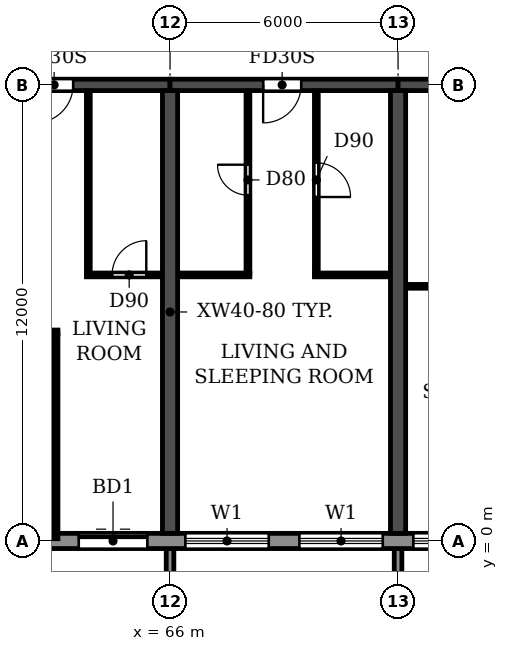
"""IFC4 building model, lengths in metres.
Left out: names, types, materials, properties, quantities, classifications, styles, units other than length and angle.
Written with IfcOpenShell. Run it as: python <this file> out.ifc"""

import sys

from ifc_helpers import new_model, si_unit, direction, frame, frame_2d, origin, place, context, subcontext, project, spatial, polyline, rectangle, outline, extrude, source, transform, mapped, element, fill, save


model = new_model("IFC4")
c1 = context("Model", 3, precision=1e-05, world=origin(), true_north=direction((0.0, 1.0)))
c2 = subcontext(c1, "Body", "Model", "MODEL_VIEW")
j1 = project(units=[si_unit("LENGTHUNIT", "METRE"), si_unit("PLANEANGLEUNIT", "RADIAN")], contexts=[c1])
p1 = place(None, origin())
s1 = spatial("IfcSite", under=j1, at=p1, CompositionType="ELEMENT")
p2 = place(p1, origin())
s2 = spatial("IfcBuilding", under=s1, at=p2, CompositionType="ELEMENT")
p3 = place(p2, frame((0.0, 0.0, 23.4)))
s3 = spatial("IfcBuildingStorey", under=s2, at=p3, CompositionType="ELEMENT", Elevation=23.4)
for number, where, z_axis, x_axis in (
    (1, (66.0, 0.2, 0.0), (0.0, 0.0, 1.0), (0.0, 1.0, 0.0)),
    (2, (72.0, 0.2, 0.0), (0.0, 0.0, 1.0), (0.0, 1.0, 0.0)),
):
    element("IfcWall", number, at=place(p3, frame(where, z_axis=z_axis, x_axis=x_axis)), inside=s3, PredefinedType="SHEAR", context=c2, shape_type="SweptSolid", body=[
        extrude(rectangle(XDim=11.65, YDim=0.4, at=frame_2d((5.825, 0.0))), origin(), (0.0, 0.0, 1.0), 3.05),
    ])
p4 = place(p3, frame((60.0, 12.0, 0.0), z_axis=(0.0, 0.0, 1.0), x_axis=(1.0, 0.0, 0.0)))
e3 = element("IfcWall", 3, at=p4, inside=s3, PredefinedType="SHEAR", context=c2, shape_type="SweptSolid", body=[
    extrude(rectangle(XDim=6.0, YDim=0.3, at=frame_2d((3.0, 0.0))), origin(), (0.0, 0.0, 1.0), 2.45),
])
p5 = place(p4, frame((2.45, 0.0, 0.0)))
e4 = element("IfcOpeningElement", 4, at=p5, cuts=e3, PredefinedType="OPENING", context=c2, shape_type="SweptSolid", body=[
    extrude(rectangle(XDim=1.0, YDim=2.1, at=frame_2d((0.5, 1.05))), frame((0.0, 0.16, 0.0), z_axis=(0.0, -1.0, 0.0), x_axis=(1.0, 0.0, 0.0)), (0.0, 0.0, 1.0), 0.32),
])
p6 = place(p3, frame((66.0, 12.0, 0.0), z_axis=(0.0, 0.0, 1.0), x_axis=(1.0, 0.0, 0.0)))
e5 = element("IfcWall", 5, at=p6, inside=s3, PredefinedType="SHEAR", context=c2, shape_type="SweptSolid", body=[
    extrude(rectangle(XDim=6.0, YDim=0.3, at=frame_2d((3.0, 0.0))), origin(), (0.0, 0.0, 1.0), 2.45),
])
p7 = place(p6, frame((2.45, 0.0, 0.0)))
e6 = element("IfcOpeningElement", 6, at=p7, cuts=e5, PredefinedType="OPENING", context=c2, shape_type="SweptSolid", body=[
    extrude(rectangle(XDim=1.0, YDim=2.1, at=frame_2d((0.5, 1.05))), frame((0.0, 0.16, 0.0), z_axis=(0.0, -1.0, 0.0), x_axis=(1.0, 0.0, 0.0)), (0.0, 0.0, 1.0), 0.32),
])
p8 = place(p3, frame((72.0, 12.0, 0.0), z_axis=(0.0, 0.0, 1.0), x_axis=(1.0, 0.0, 0.0)))
e7 = element("IfcWall", 7, at=p8, inside=s3, PredefinedType="SHEAR", context=c2, shape_type="SweptSolid", body=[
    extrude(rectangle(XDim=6.0, YDim=0.3, at=frame_2d((3.0, 0.0))), origin(), (0.0, 0.0, 1.0), 2.45),
])
p9 = place(p8, frame((2.55, 0.0, 0.0)))
e8 = element("IfcOpeningElement", 8, at=p9, cuts=e7, PredefinedType="OPENING", context=c2, shape_type="SweptSolid", body=[
    extrude(rectangle(XDim=1.0, YDim=2.1, at=frame_2d((0.5, 1.05))), frame((0.0, 0.16, 0.0), z_axis=(0.0, -1.0, 0.0), x_axis=(1.0, 0.0, 0.0)), (0.0, 0.0, 1.0), 0.32),
])
p10 = place(p3, frame((4.683, 0.0, 0.0), z_axis=(0.0, 0.0, 1.0), x_axis=(1.0, 0.0, 0.0)))
e9 = element("IfcWall", 9, at=p10, inside=s3, PredefinedType="STANDARD", context=c2, shape_type="SweptSolid", body=[
    extrude(rectangle(XDim=92.634, YDim=0.4, at=frame_2d((46.317, 0.0))), origin(), (0.0, 0.0, 1.0), 3.05),
])
p11 = place(p10, frame((1.717, 0.0, 0.9)))
e10 = element("IfcOpeningElement", 10, at=p11, cuts=e9, PredefinedType="OPENING", context=c2, shape_type="SweptSolid", body=[
    extrude(rectangle(XDim=2.2, YDim=1.5, at=frame_2d((1.1, 0.75))), frame((0.0, 0.21, 0.0), z_axis=(0.0, -1.0, 0.0), x_axis=(1.0, 0.0, 0.0)), (0.0, 0.0, 1.0), 0.42),
])
p12 = place(p10, frame((4.717, 0.0, 0.9)))
e11 = element("IfcOpeningElement", 11, at=p12, cuts=e9, PredefinedType="OPENING", context=c2, shape_type="SweptSolid", body=[
    extrude(rectangle(XDim=2.2, YDim=1.5, at=frame_2d((1.1, 0.75))), frame((0.0, 0.21, 0.0), z_axis=(0.0, -1.0, 0.0), x_axis=(1.0, 0.0, 0.0)), (0.0, 0.0, 1.0), 0.42),
])
p13 = place(p10, frame((7.717, 0.0, 0.9)))
e12 = element("IfcOpeningElement", 12, at=p13, cuts=e9, PredefinedType="OPENING", context=c2, shape_type="SweptSolid", body=[
    extrude(rectangle(XDim=2.2, YDim=1.5, at=frame_2d((1.1, 0.75))), frame((0.0, 0.21, 0.0), z_axis=(0.0, -1.0, 0.0), x_axis=(1.0, 0.0, 0.0)), (0.0, 0.0, 1.0), 0.42),
])
p14 = place(p10, frame((10.717, 0.0, 0.9)))
e13 = element("IfcOpeningElement", 13, at=p14, cuts=e9, PredefinedType="OPENING", context=c2, shape_type="SweptSolid", body=[
    extrude(rectangle(XDim=2.2, YDim=1.5, at=frame_2d((1.1, 0.75))), frame((0.0, 0.21, 0.0), z_axis=(0.0, -1.0, 0.0), x_axis=(1.0, 0.0, 0.0)), (0.0, 0.0, 1.0), 0.42),
])
p15 = place(p10, frame((13.717, 0.0, 0.9)))
e14 = element("IfcOpeningElement", 14, at=p15, cuts=e9, PredefinedType="OPENING", context=c2, shape_type="SweptSolid", body=[
    extrude(rectangle(XDim=2.2, YDim=1.5, at=frame_2d((1.1, 0.75))), frame((0.0, 0.21, 0.0), z_axis=(0.0, -1.0, 0.0), x_axis=(1.0, 0.0, 0.0)), (0.0, 0.0, 1.0), 0.42),
])
p16 = place(p10, frame((16.717, 0.0, 0.9)))
e15 = element("IfcOpeningElement", 15, at=p16, cuts=e9, PredefinedType="OPENING", context=c2, shape_type="SweptSolid", body=[
    extrude(rectangle(XDim=2.2, YDim=1.5, at=frame_2d((1.1, 0.75))), frame((0.0, 0.21, 0.0), z_axis=(0.0, -1.0, 0.0), x_axis=(1.0, 0.0, 0.0)), (0.0, 0.0, 1.0), 0.42),
])
p17 = place(p10, frame((19.917, 0.0, 0.0)))
e16 = element("IfcOpeningElement", 16, at=p17, cuts=e9, PredefinedType="OPENING", context=c2, shape_type="SweptSolid", body=[
    extrude(rectangle(XDim=1.8, YDim=2.4, at=frame_2d((0.9, 1.2))), frame((0.0, 0.21, 0.0), z_axis=(0.0, -1.0, 0.0), x_axis=(1.0, 0.0, 0.0)), (0.0, 0.0, 1.0), 0.42),
])
p18 = place(p10, frame((22.717, 0.0, 0.9)))
e17 = element("IfcOpeningElement", 17, at=p18, cuts=e9, PredefinedType="OPENING", context=c2, shape_type="SweptSolid", body=[
    extrude(rectangle(XDim=2.2, YDim=1.5, at=frame_2d((1.1, 0.75))), frame((0.0, 0.21, 0.0), z_axis=(0.0, -1.0, 0.0), x_axis=(1.0, 0.0, 0.0)), (0.0, 0.0, 1.0), 0.42),
])
p19 = place(p10, frame((25.717, 0.0, 0.9)))
e18 = element("IfcOpeningElement", 18, at=p19, cuts=e9, PredefinedType="OPENING", context=c2, shape_type="SweptSolid", body=[
    extrude(rectangle(XDim=2.2, YDim=1.5, at=frame_2d((1.1, 0.75))), frame((0.0, 0.21, 0.0), z_axis=(0.0, -1.0, 0.0), x_axis=(1.0, 0.0, 0.0)), (0.0, 0.0, 1.0), 0.42),
])
p20 = place(p10, frame((28.717, 0.0, 0.9)))
e19 = element("IfcOpeningElement", 19, at=p20, cuts=e9, PredefinedType="OPENING", context=c2, shape_type="SweptSolid", body=[
    extrude(rectangle(XDim=2.2, YDim=1.5, at=frame_2d((1.1, 0.75))), frame((0.0, 0.21, 0.0), z_axis=(0.0, -1.0, 0.0), x_axis=(1.0, 0.0, 0.0)), (0.0, 0.0, 1.0), 0.42),
])
p21 = place(p10, frame((31.917, 0.0, 0.0)))
e20 = element("IfcOpeningElement", 20, at=p21, cuts=e9, PredefinedType="OPENING", context=c2, shape_type="SweptSolid", body=[
    extrude(rectangle(XDim=1.8, YDim=2.4, at=frame_2d((0.9, 1.2))), frame((0.0, 0.21, 0.0), z_axis=(0.0, -1.0, 0.0), x_axis=(1.0, 0.0, 0.0)), (0.0, 0.0, 1.0), 0.42),
])
p22 = place(p10, frame((34.717, 0.0, 0.9)))
e21 = element("IfcOpeningElement", 21, at=p22, cuts=e9, PredefinedType="OPENING", context=c2, shape_type="SweptSolid", body=[
    extrude(rectangle(XDim=2.2, YDim=1.5, at=frame_2d((1.1, 0.75))), frame((0.0, 0.21, 0.0), z_axis=(0.0, -1.0, 0.0), x_axis=(1.0, 0.0, 0.0)), (0.0, 0.0, 1.0), 0.42),
])
p23 = place(p10, frame((37.717, 0.0, 0.9)))
e22 = element("IfcOpeningElement", 22, at=p23, cuts=e9, PredefinedType="OPENING", context=c2, shape_type="SweptSolid", body=[
    extrude(rectangle(XDim=2.2, YDim=1.5, at=frame_2d((1.1, 0.75))), frame((0.0, 0.21, 0.0), z_axis=(0.0, -1.0, 0.0), x_axis=(1.0, 0.0, 0.0)), (0.0, 0.0, 1.0), 0.42),
])
p24 = place(p10, frame((40.717, 0.0, 0.9)))
e23 = element("IfcOpeningElement", 23, at=p24, cuts=e9, PredefinedType="OPENING", context=c2, shape_type="SweptSolid", body=[
    extrude(rectangle(XDim=2.2, YDim=1.5, at=frame_2d((1.1, 0.75))), frame((0.0, 0.21, 0.0), z_axis=(0.0, -1.0, 0.0), x_axis=(1.0, 0.0, 0.0)), (0.0, 0.0, 1.0), 0.42),
])
p25 = place(p10, frame((43.917, 0.0, 0.0)))
e24 = element("IfcOpeningElement", 24, at=p25, cuts=e9, PredefinedType="OPENING", context=c2, shape_type="SweptSolid", body=[
    extrude(rectangle(XDim=1.8, YDim=2.4, at=frame_2d((0.9, 1.2))), frame((0.0, 0.21, 0.0), z_axis=(0.0, -1.0, 0.0), x_axis=(1.0, 0.0, 0.0)), (0.0, 0.0, 1.0), 0.42),
])
p26 = place(p10, frame((46.717, 0.0, 0.9)))
e25 = element("IfcOpeningElement", 25, at=p26, cuts=e9, PredefinedType="OPENING", context=c2, shape_type="SweptSolid", body=[
    extrude(rectangle(XDim=2.2, YDim=1.5, at=frame_2d((1.1, 0.75))), frame((0.0, 0.21, 0.0), z_axis=(0.0, -1.0, 0.0), x_axis=(1.0, 0.0, 0.0)), (0.0, 0.0, 1.0), 0.42),
])
p27 = place(p10, frame((49.717, 0.0, 0.9)))
e26 = element("IfcOpeningElement", 26, at=p27, cuts=e9, PredefinedType="OPENING", context=c2, shape_type="SweptSolid", body=[
    extrude(rectangle(XDim=2.2, YDim=1.5, at=frame_2d((1.1, 0.75))), frame((0.0, 0.21, 0.0), z_axis=(0.0, -1.0, 0.0), x_axis=(1.0, 0.0, 0.0)), (0.0, 0.0, 1.0), 0.42),
])
p28 = place(p10, frame((52.717, 0.0, 0.9)))
e27 = element("IfcOpeningElement", 27, at=p28, cuts=e9, PredefinedType="OPENING", context=c2, shape_type="SweptSolid", body=[
    extrude(rectangle(XDim=2.2, YDim=1.5, at=frame_2d((1.1, 0.75))), frame((0.0, 0.21, 0.0), z_axis=(0.0, -1.0, 0.0), x_axis=(1.0, 0.0, 0.0)), (0.0, 0.0, 1.0), 0.42),
])
p29 = place(p10, frame((55.717, 0.0, 0.9)))
e28 = element("IfcOpeningElement", 28, at=p29, cuts=e9, PredefinedType="OPENING", context=c2, shape_type="SweptSolid", body=[
    extrude(rectangle(XDim=2.2, YDim=1.5, at=frame_2d((1.1, 0.75))), frame((0.0, 0.21, 0.0), z_axis=(0.0, -1.0, 0.0), x_axis=(1.0, 0.0, 0.0)), (0.0, 0.0, 1.0), 0.42),
])
p30 = place(p10, frame((58.917, 0.0, 0.0)))
e29 = element("IfcOpeningElement", 29, at=p30, cuts=e9, PredefinedType="OPENING", context=c2, shape_type="SweptSolid", body=[
    extrude(rectangle(XDim=1.8, YDim=2.4, at=frame_2d((0.9, 1.2))), frame((0.0, 0.21, 0.0), z_axis=(0.0, -1.0, 0.0), x_axis=(1.0, 0.0, 0.0)), (0.0, 0.0, 1.0), 0.42),
])
p31 = place(p10, frame((61.717, 0.0, 0.9)))
e30 = element("IfcOpeningElement", 30, at=p31, cuts=e9, PredefinedType="OPENING", context=c2, shape_type="SweptSolid", body=[
    extrude(rectangle(XDim=2.2, YDim=1.5, at=frame_2d((1.1, 0.75))), frame((0.0, 0.21, 0.0), z_axis=(0.0, -1.0, 0.0), x_axis=(1.0, 0.0, 0.0)), (0.0, 0.0, 1.0), 0.42),
])
p32 = place(p10, frame((64.717, 0.0, 0.9)))
e31 = element("IfcOpeningElement", 31, at=p32, cuts=e9, PredefinedType="OPENING", context=c2, shape_type="SweptSolid", body=[
    extrude(rectangle(XDim=2.2, YDim=1.5, at=frame_2d((1.1, 0.75))), frame((0.0, 0.21, 0.0), z_axis=(0.0, -1.0, 0.0), x_axis=(1.0, 0.0, 0.0)), (0.0, 0.0, 1.0), 0.42),
])
p33 = place(p10, frame((67.717, 0.0, 0.9)))
e32 = element("IfcOpeningElement", 32, at=p33, cuts=e9, PredefinedType="OPENING", context=c2, shape_type="SweptSolid", body=[
    extrude(rectangle(XDim=2.2, YDim=1.5, at=frame_2d((1.1, 0.75))), frame((0.0, 0.21, 0.0), z_axis=(0.0, -1.0, 0.0), x_axis=(1.0, 0.0, 0.0)), (0.0, 0.0, 1.0), 0.42),
])
p34 = place(p10, frame((70.917, 0.0, 0.0)))
e33 = element("IfcOpeningElement", 33, at=p34, cuts=e9, PredefinedType="OPENING", context=c2, shape_type="SweptSolid", body=[
    extrude(rectangle(XDim=1.8, YDim=2.4, at=frame_2d((0.9, 1.2))), frame((0.0, 0.21, 0.0), z_axis=(0.0, -1.0, 0.0), x_axis=(1.0, 0.0, 0.0)), (0.0, 0.0, 1.0), 0.42),
])
p35 = place(p10, frame((73.717, 0.0, 0.9)))
e34 = element("IfcOpeningElement", 34, at=p35, cuts=e9, PredefinedType="OPENING", context=c2, shape_type="SweptSolid", body=[
    extrude(rectangle(XDim=2.2, YDim=1.5, at=frame_2d((1.1, 0.75))), frame((0.0, 0.21, 0.0), z_axis=(0.0, -1.0, 0.0), x_axis=(1.0, 0.0, 0.0)), (0.0, 0.0, 1.0), 0.42),
])
p36 = place(p10, frame((76.717, 0.0, 0.9)))
e35 = element("IfcOpeningElement", 35, at=p36, cuts=e9, PredefinedType="OPENING", context=c2, shape_type="SweptSolid", body=[
    extrude(rectangle(XDim=2.2, YDim=1.5, at=frame_2d((1.1, 0.75))), frame((0.0, 0.21, 0.0), z_axis=(0.0, -1.0, 0.0), x_axis=(1.0, 0.0, 0.0)), (0.0, 0.0, 1.0), 0.42),
])
p37 = place(p10, frame((79.717, 0.0, 0.9)))
e36 = element("IfcOpeningElement", 36, at=p37, cuts=e9, PredefinedType="OPENING", context=c2, shape_type="SweptSolid", body=[
    extrude(rectangle(XDim=2.2, YDim=1.5, at=frame_2d((1.1, 0.75))), frame((0.0, 0.21, 0.0), z_axis=(0.0, -1.0, 0.0), x_axis=(1.0, 0.0, 0.0)), (0.0, 0.0, 1.0), 0.42),
])
p38 = place(p10, frame((82.717, 0.0, 0.9)))
e37 = element("IfcOpeningElement", 37, at=p38, cuts=e9, PredefinedType="OPENING", context=c2, shape_type="SweptSolid", body=[
    extrude(rectangle(XDim=2.2, YDim=1.5, at=frame_2d((1.1, 0.75))), frame((0.0, 0.21, 0.0), z_axis=(0.0, -1.0, 0.0), x_axis=(1.0, 0.0, 0.0)), (0.0, 0.0, 1.0), 0.42),
])
p39 = place(p10, frame((85.717, 0.0, 0.9)))
e38 = element("IfcOpeningElement", 38, at=p39, cuts=e9, PredefinedType="OPENING", context=c2, shape_type="SweptSolid", body=[
    extrude(rectangle(XDim=2.2, YDim=1.5, at=frame_2d((1.1, 0.75))), frame((0.0, 0.21, 0.0), z_axis=(0.0, -1.0, 0.0), x_axis=(1.0, 0.0, 0.0)), (0.0, 0.0, 1.0), 0.42),
])
p40 = place(p10, frame((88.717, 0.0, 0.9)))
e39 = element("IfcOpeningElement", 39, at=p40, cuts=e9, PredefinedType="OPENING", context=c2, shape_type="SweptSolid", body=[
    extrude(rectangle(XDim=2.2, YDim=1.5, at=frame_2d((1.1, 0.75))), frame((0.0, 0.21, 0.0), z_axis=(0.0, -1.0, 0.0), x_axis=(1.0, 0.0, 0.0)), (0.0, 0.0, 1.0), 0.42),
])
m1 = source(origin(), c2, "Body", "SweptSolid", [
    extrude(outline(polyline([(0.0, 0.0), (0.2, 0.0), (0.2, 1.65), (0.0, 1.65), (0.0, 0.0)])), origin(), (0.0, 0.0, 1.0), 3.1),
])
for number, where in (
    (40, (65.9, -1.85, 0.0)),
    (41, (71.9, -1.85, 0.0)),
):
    element("IfcWall", number, at=place(p3, frame(where)), inside=s3, PredefinedType="STANDARD", context=c2, shape_type="MappedRepresentation", body=[
        mapped(m1, transform((0.0, 0.0, 0.0))),
    ])
p41 = place(p3, frame((60.21, 5.5, 0.0), z_axis=(0.0, 0.0, 1.0), x_axis=(1.0, 0.0, 0.0)))
e42 = element("IfcWall", 42, at=p41, inside=s3, PredefinedType="PARTITIONING", context=c2, shape_type="SweptSolid", body=[
    extrude(rectangle(XDim=2.84, YDim=0.1, at=frame_2d((1.42, 0.0))), origin(), (0.0, 0.0, 1.0), 3.05),
])
p42 = place(p41, frame((0.29, 0.0, 0.0)))
e43 = element("IfcOpeningElement", 43, at=p42, cuts=e42, PredefinedType="OPENING", context=c2, shape_type="SweptSolid", body=[
    extrude(rectangle(XDim=0.9, YDim=2.1, at=frame_2d((0.45, 1.05))), frame((0.0, 0.06, 0.0), z_axis=(0.0, -1.0, 0.0), x_axis=(1.0, 0.0, 0.0)), (0.0, 0.0, 1.0), 0.12),
])
p43 = place(p3, frame((72.21, 6.7, 0.0), z_axis=(0.0, 0.0, 1.0), x_axis=(1.0, 0.0, 0.0)))
e44 = element("IfcWall", 44, at=p43, inside=s3, PredefinedType="PARTITIONING", context=c2, shape_type="SweptSolid", body=[
    extrude(rectangle(XDim=1.99, YDim=0.1, at=frame_2d((0.995, 0.0))), origin(), (0.0, 0.0, 1.0), 3.05),
])
p44 = place(p3, frame((63.8, 7.0, 0.0), z_axis=(0.0, 0.0, 1.0), x_axis=(1.0, 0.0, 0.0)))
e45 = element("IfcWall", 45, at=p44, inside=s3, PredefinedType="PARTITIONING", context=c2, shape_type="SweptSolid", body=[
    extrude(rectangle(XDim=1.99, YDim=0.1, at=frame_2d((0.995, 0.0))), origin(), (0.0, 0.0, 1.0), 3.05),
])
p45 = place(p44, frame((0.675, 0.0, 0.0)))
e46 = element("IfcOpeningElement", 46, at=p45, cuts=e45, PredefinedType="OPENING", context=c2, shape_type="SweptSolid", body=[
    extrude(rectangle(XDim=0.9, YDim=2.1, at=frame_2d((0.45, 1.05))), frame((0.0, 0.06, 0.0), z_axis=(0.0, -1.0, 0.0), x_axis=(1.0, 0.0, 0.0)), (0.0, 0.0, 1.0), 0.12),
])
p46 = place(p3, frame((66.21, 7.0, 0.0), z_axis=(0.0, 0.0, 1.0), x_axis=(1.0, 0.0, 0.0)))
e47 = element("IfcWall", 47, at=p46, inside=s3, PredefinedType="PARTITIONING", context=c2, shape_type="SweptSolid", body=[
    extrude(rectangle(XDim=1.89, YDim=0.1, at=frame_2d((0.945, 0.0))), origin(), (0.0, 0.0, 1.0), 3.05),
])
p47 = place(p3, frame((69.8, 7.0, 0.0), z_axis=(0.0, 0.0, 1.0), x_axis=(1.0, 0.0, 0.0)))
e48 = element("IfcWall", 48, at=p47, inside=s3, PredefinedType="PARTITIONING", context=c2, shape_type="SweptSolid", body=[
    extrude(rectangle(XDim=1.99, YDim=0.1, at=frame_2d((0.995, 0.0))), origin(), (0.0, 0.0, 1.0), 3.05),
])
p48 = place(p3, frame((63.0, 0.06, 0.0), z_axis=(0.0, 0.0, 1.0), x_axis=(0.0, 1.0, 0.0)))
e49 = element("IfcWall", 49, at=p48, inside=s3, PredefinedType="PARTITIONING", context=c2, shape_type="SweptSolid", body=[
    extrude(rectangle(XDim=5.39, YDim=0.1, at=frame_2d((2.695, 0.0))), origin(), (0.0, 0.0, 1.0), 3.05),
])
p49 = place(p3, frame((63.85, 7.05, 0.0), z_axis=(0.0, 0.0, 1.0), x_axis=(0.0, 1.0, 0.0)))
e50 = element("IfcWall", 50, at=p49, inside=s3, PredefinedType="PARTITIONING", context=c2, shape_type="SweptSolid", body=[
    extrude(rectangle(XDim=4.79, YDim=0.1, at=frame_2d((2.395, 0.0))), origin(), (0.0, 0.0, 1.0), 3.05),
])
p50 = place(p3, frame((68.05, 7.05, 0.0), z_axis=(0.0, 0.0, 1.0), x_axis=(0.0, 1.0, 0.0)))
e51 = element("IfcWall", 51, at=p50, inside=s3, PredefinedType="PARTITIONING", context=c2, shape_type="SweptSolid", body=[
    extrude(rectangle(XDim=4.79, YDim=0.1, at=frame_2d((2.395, 0.0))), origin(), (0.0, 0.0, 1.0), 3.05),
])
p51 = place(p50, frame((2.05, 0.0, 0.0)))
e52 = element("IfcOpeningElement", 52, at=p51, cuts=e51, PredefinedType="OPENING", context=c2, shape_type="SweptSolid", body=[
    extrude(rectangle(XDim=0.8, YDim=2.1, at=frame_2d((0.4, 1.05))), frame((0.0, 0.06, 0.0), z_axis=(0.0, -1.0, 0.0), x_axis=(1.0, 0.0, 0.0)), (0.0, 0.0, 1.0), 0.12),
])
p52 = place(p3, frame((69.85, 7.05, 0.0), z_axis=(0.0, 0.0, 1.0), x_axis=(0.0, 1.0, 0.0)))
e53 = element("IfcWall", 53, at=p52, inside=s3, PredefinedType="PARTITIONING", context=c2, shape_type="SweptSolid", body=[
    extrude(rectangle(XDim=4.79, YDim=0.1, at=frame_2d((2.395, 0.0))), origin(), (0.0, 0.0, 1.0), 3.05),
])
p53 = place(p52, frame((2.0, 0.0, 0.0)))
e54 = element("IfcOpeningElement", 54, at=p53, cuts=e53, PredefinedType="OPENING", context=c2, shape_type="SweptSolid", body=[
    extrude(rectangle(XDim=0.9, YDim=2.1, at=frame_2d((0.45, 1.05))), frame((0.0, 0.06, 0.0), z_axis=(0.0, -1.0, 0.0), x_axis=(1.0, 0.0, 0.0)), (0.0, 0.0, 1.0), 0.12),
])
p54 = place(p30, origin())
e55 = element("IfcDoor", 55, at=p54, inside=s3, OperationType="DOUBLE_DOOR_SLIDING", PredefinedType="DOOR", context=c2, shape_type="SweptSolid", body=[
    extrude(rectangle(XDim=1.8, YDim=2.4, at=frame_2d((0.9, 1.2))), frame((0.0, 0.025, 0.0), z_axis=(0.0, -1.0, 0.0), x_axis=(1.0, 0.0, 0.0)), (0.0, 0.0, 1.0), 0.05),
])
fill(e29, e55)
p55 = place(p31, origin())
e56 = element("IfcWindow", 56, at=p55, inside=s3, PartitioningType="DOUBLE_PANEL_HORIZONTAL", PredefinedType="WINDOW", context=c2, shape_type="SweptSolid", body=[
    extrude(rectangle(XDim=2.2, YDim=1.5, at=frame_2d((1.1, 0.75))), frame((0.0, 0.03, 0.0), z_axis=(0.0, -1.0, 0.0), x_axis=(1.0, 0.0, 0.0)), (0.0, 0.0, 1.0), 0.06),
])
fill(e30, e56)
p56 = place(p32, origin())
e57 = element("IfcWindow", 57, at=p56, inside=s3, PartitioningType="DOUBLE_PANEL_HORIZONTAL", PredefinedType="WINDOW", context=c2, shape_type="SweptSolid", body=[
    extrude(rectangle(XDim=2.2, YDim=1.5, at=frame_2d((1.1, 0.75))), frame((0.0, 0.03, 0.0), z_axis=(0.0, -1.0, 0.0), x_axis=(1.0, 0.0, 0.0)), (0.0, 0.0, 1.0), 0.06),
])
fill(e31, e57)
p57 = place(p33, origin())
e58 = element("IfcWindow", 58, at=p57, inside=s3, PartitioningType="DOUBLE_PANEL_HORIZONTAL", PredefinedType="WINDOW", context=c2, shape_type="SweptSolid", body=[
    extrude(rectangle(XDim=2.2, YDim=1.5, at=frame_2d((1.1, 0.75))), frame((0.0, 0.03, 0.0), z_axis=(0.0, -1.0, 0.0), x_axis=(1.0, 0.0, 0.0)), (0.0, 0.0, 1.0), 0.06),
])
fill(e32, e58)
p58 = place(p5, frame((1.0, 0.0, 0.0), z_axis=(0.0, 0.0, 1.0), x_axis=(-1.0, 0.0, 0.0)))
e59 = element("IfcDoor", 59, at=p58, inside=s3, OperationType="SINGLE_SWING_RIGHT", PredefinedType="DOOR", context=c2, shape_type="SweptSolid", body=[
    extrude(rectangle(XDim=1.0, YDim=2.1, at=frame_2d((0.5, 1.05))), frame((0.0, 0.025, 0.0), z_axis=(0.0, -1.0, 0.0), x_axis=(1.0, 0.0, 0.0)), (0.0, 0.0, 1.0), 0.05),
])
fill(e4, e59)
p59 = place(p45, origin())
e60 = element("IfcDoor", 60, at=p59, inside=s3, OperationType="SINGLE_SWING_RIGHT", PredefinedType="DOOR", context=c2, shape_type="SweptSolid", body=[
    extrude(rectangle(XDim=0.9, YDim=2.1, at=frame_2d((0.45, 1.05))), frame((0.0, 0.025, 0.0), z_axis=(0.0, -1.0, 0.0), x_axis=(1.0, 0.0, 0.0)), (0.0, 0.0, 1.0), 0.05),
])
fill(e46, e60)
p60 = place(p51, origin())
e61 = element("IfcDoor", 61, at=p60, inside=s3, OperationType="SINGLE_SWING_RIGHT", PredefinedType="DOOR", context=c2, shape_type="SweptSolid", body=[
    extrude(rectangle(XDim=0.8, YDim=2.1, at=frame_2d((0.4, 1.05))), frame((0.0, 0.025, 0.0), z_axis=(0.0, -1.0, 0.0), x_axis=(1.0, 0.0, 0.0)), (0.0, 0.0, 1.0), 0.05),
])
fill(e52, e61)
p61 = place(p7, frame((1.0, 0.0, 0.0), z_axis=(0.0, 0.0, 1.0), x_axis=(-1.0, 0.0, 0.0)))
e62 = element("IfcDoor", 62, at=p61, inside=s3, OperationType="SINGLE_SWING_RIGHT", PredefinedType="DOOR", context=c2, shape_type="SweptSolid", body=[
    extrude(rectangle(XDim=1.0, YDim=2.1, at=frame_2d((0.5, 1.05))), frame((0.0, 0.025, 0.0), z_axis=(0.0, -1.0, 0.0), x_axis=(1.0, 0.0, 0.0)), (0.0, 0.0, 1.0), 0.05),
])
fill(e6, e62)
p62 = place(p53, frame((0.9, 0.0, 0.0), z_axis=(0.0, 0.0, 1.0), x_axis=(-1.0, 0.0, 0.0)))
e63 = element("IfcDoor", 63, at=p62, inside=s3, OperationType="SINGLE_SWING_RIGHT", PredefinedType="DOOR", context=c2, shape_type="SweptSolid", body=[
    extrude(rectangle(XDim=0.9, YDim=2.1, at=frame_2d((0.45, 1.05))), frame((0.0, 0.025, 0.0), z_axis=(0.0, -1.0, 0.0), x_axis=(1.0, 0.0, 0.0)), (0.0, 0.0, 1.0), 0.05),
])
fill(e54, e63)
save(model, sys.argv[1])
